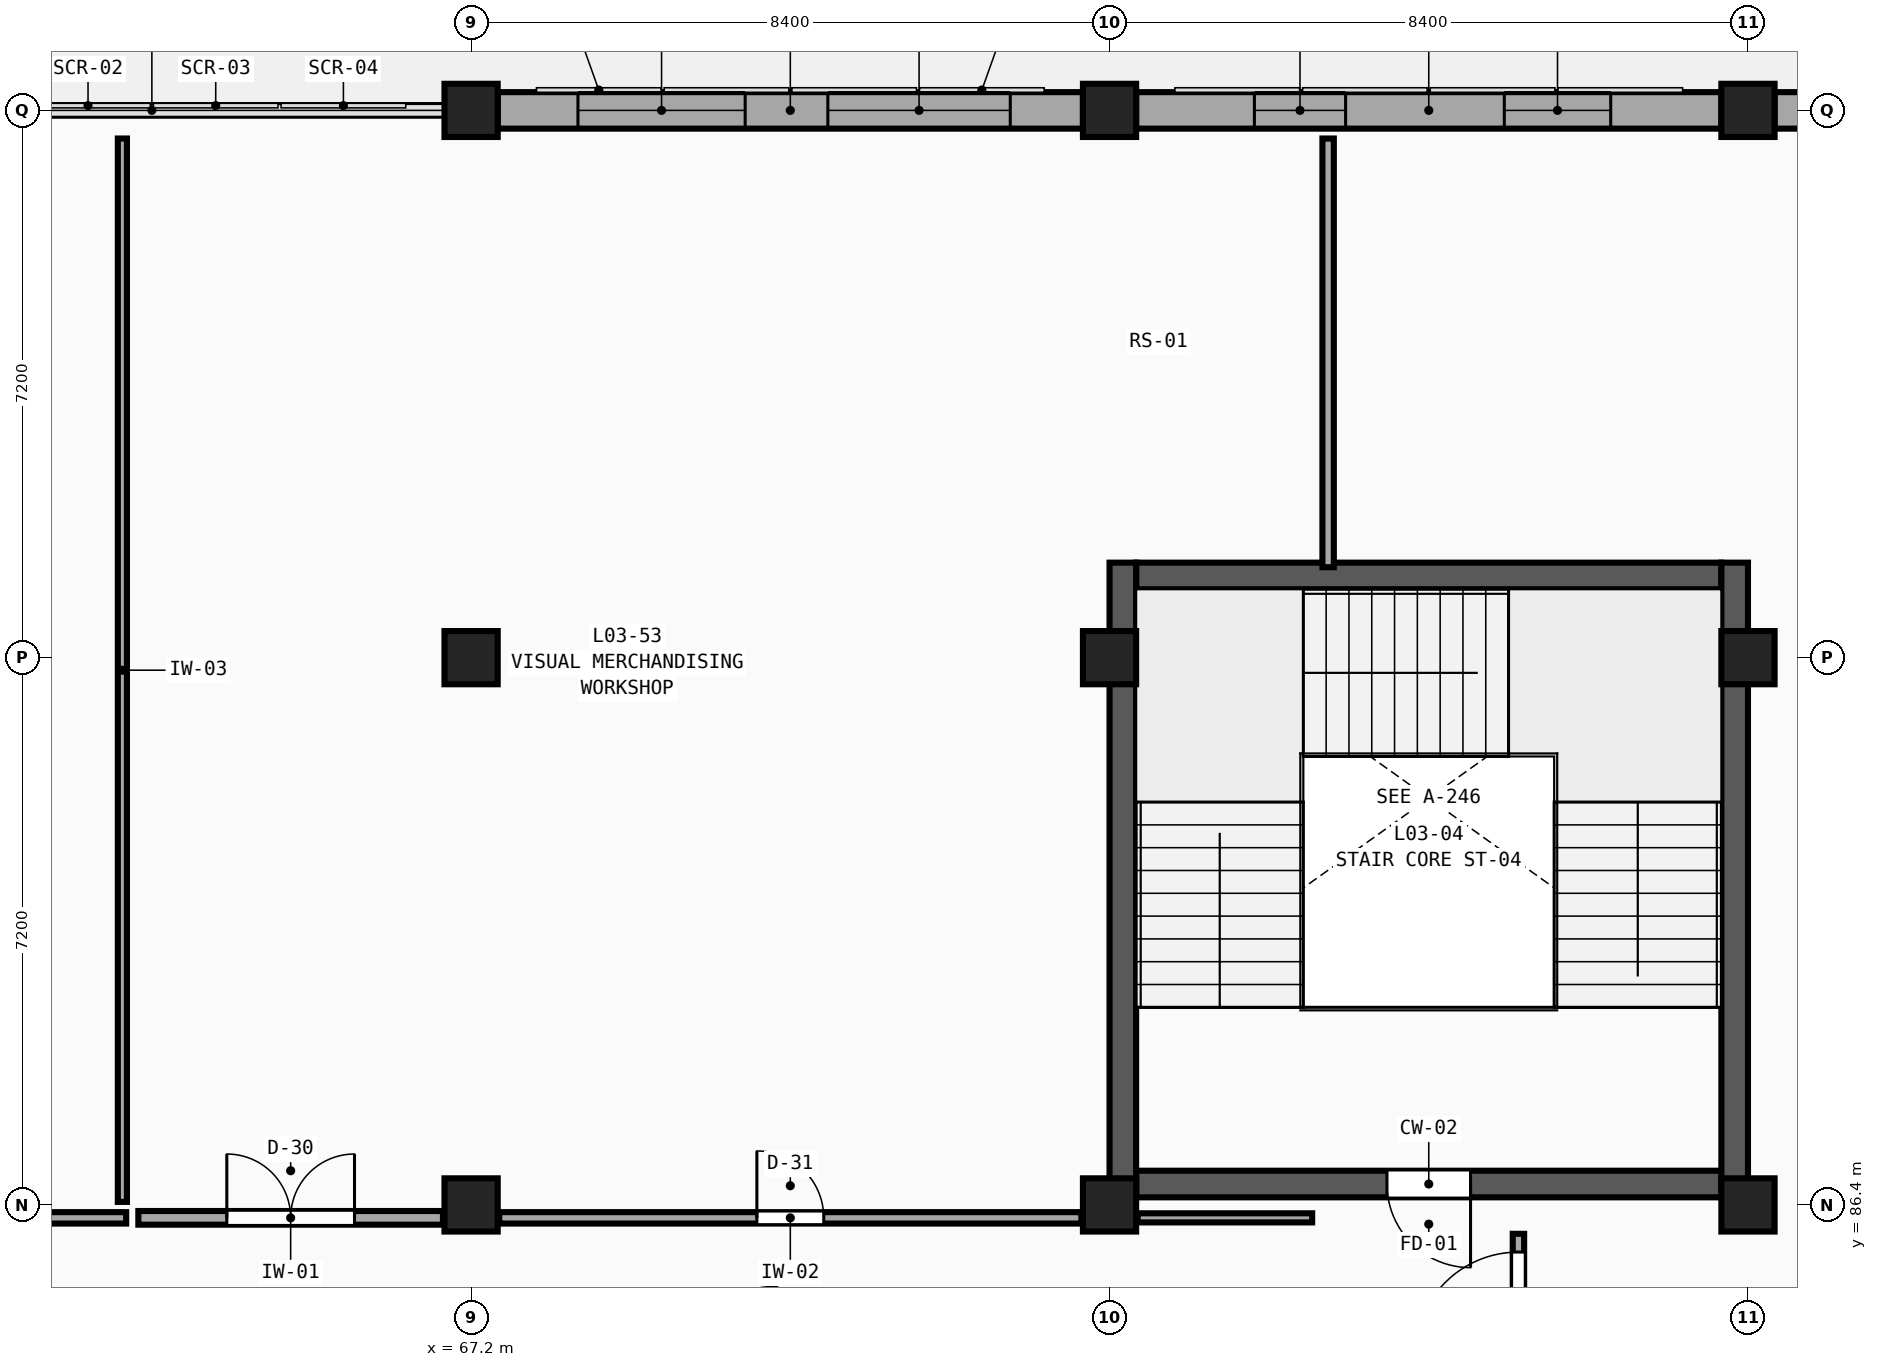
"""IFC4 building model, lengths in metres.
Left out: names, types, materials, properties, quantities, classifications, styles, units other than length and angle.
Written with IfcOpenShell. Run it as: python <this file> out.ifc"""

import sys

from ifc_helpers import new_model, si_unit, direction, frame, frame_2d, origin, origin_2d, place, context, subcontext, project, spatial, rectangle, extrude, element, fill, save


model = new_model("IFC4")
c1 = context("Model", 3, precision=1e-05, world=origin(), true_north=direction((0.0, 1.0)))
c2 = subcontext(c1, "Body", "Model", "MODEL_VIEW")
j1 = project(units=[si_unit("LENGTHUNIT", "METRE"), si_unit("PLANEANGLEUNIT", "RADIAN")], contexts=[c1])
p1 = place(None, origin())
s1 = spatial("IfcSite", under=j1, at=p1, CompositionType="ELEMENT")
p2 = place(p1, origin())
s2 = spatial("IfcBuilding", under=s1, at=p2, CompositionType="ELEMENT")
p3 = place(p2, frame((0.0, 0.0, 14.4)))
s3 = spatial("IfcBuildingStorey", under=s2, at=p3, CompositionType="ELEMENT", Elevation=14.4)
for number, where, z_axis, x_axis in (
    (1, (67.2, 86.4, 0.0), (0.0, 0.0, 1.0), (1.0, 0.0, 0.0)),
    (2, (67.2, 93.6, 0.0), (0.0, 0.0, 1.0), (1.0, 0.0, 0.0)),
    (3, (67.2, 100.8, 0.0), (0.0, 0.0, 1.0), (1.0, 0.0, 0.0)),
    (4, (75.6, 86.4, 0.0), (0.0, 0.0, 1.0), (1.0, 0.0, 0.0)),
    (5, (75.6, 93.6, 0.0), (0.0, 0.0, 1.0), (1.0, 0.0, 0.0)),
    (6, (75.6, 100.8, 0.0), (0.0, 0.0, 1.0), (1.0, 0.0, 0.0)),
    (7, (84.0, 86.4, 0.0), (0.0, 0.0, 1.0), (1.0, 0.0, 0.0)),
    (8, (84.0, 93.6, 0.0), (0.0, 0.0, 1.0), (1.0, 0.0, 0.0)),
    (9, (84.0, 100.8, 0.0), (0.0, 0.0, 1.0), (1.0, 0.0, 0.0)),
):
    element("IfcColumn", number, at=place(p3, frame(where, z_axis=z_axis, x_axis=x_axis)), inside=s3, PredefinedType="COLUMN", context=c2, shape_type="SweptSolid", body=[
        extrude(rectangle(XDim=0.7, YDim=0.7, at=origin_2d()), origin(), (0.0, 0.0, 1.0), 4.5),
    ])
p4 = place(p3, frame((67.55, 100.8, 0.0), z_axis=(0.0, 0.0, 1.0), x_axis=(1.0, 0.0, 0.0)))
e10 = element("IfcWall", 10, at=p4, inside=s3, PredefinedType="SOLIDWALL", context=c2, shape_type="SweptSolid", body=[
    extrude(rectangle(XDim=7.7, YDim=0.48, at=frame_2d((3.85, 0.0))), origin(), (0.0, 0.0, 1.0), 3.63),
])
p5 = place(p4, frame((1.056, 0.0, 0.75)))
e11 = element("IfcOpeningElement", 11, at=p5, cuts=e10, PredefinedType="OPENING", context=c2, shape_type="SweptSolid", body=[
    extrude(rectangle(XDim=2.2, YDim=2.73, at=frame_2d((1.1, 1.365))), frame((0.0, 0.26, 0.0), z_axis=(0.0, -1.0, 0.0), x_axis=(1.0, 0.0, 0.0)), (0.0, 0.0, 1.0), 0.52),
])
p6 = place(p4, frame((4.344, 0.0, 0.75)))
e12 = element("IfcOpeningElement", 12, at=p6, cuts=e10, PredefinedType="OPENING", context=c2, shape_type="SweptSolid", body=[
    extrude(rectangle(XDim=2.4, YDim=2.73, at=frame_2d((1.2, 1.365))), frame((0.0, 0.26, 0.0), z_axis=(0.0, -1.0, 0.0), x_axis=(1.0, 0.0, 0.0)), (0.0, 0.0, 1.0), 0.52),
])
p7 = place(p3, frame((75.95, 100.8, 0.0), z_axis=(0.0, 0.0, 1.0), x_axis=(1.0, 0.0, 0.0)))
e13 = element("IfcWall", 13, at=p7, inside=s3, PredefinedType="SOLIDWALL", context=c2, shape_type="SweptSolid", body=[
    extrude(rectangle(XDim=7.7, YDim=0.48, at=frame_2d((3.85, 0.0))), origin(), (0.0, 0.0, 1.0), 3.63),
])
p8 = place(p7, frame((1.556, 0.0, 0.75)))
e14 = element("IfcOpeningElement", 14, at=p8, cuts=e13, PredefinedType="OPENING", context=c2, shape_type="SweptSolid", body=[
    extrude(rectangle(XDim=1.2, YDim=2.73, at=frame_2d((0.6, 1.365))), frame((0.0, 0.26, 0.0), z_axis=(0.0, -1.0, 0.0), x_axis=(1.0, 0.0, 0.0)), (0.0, 0.0, 1.0), 0.52),
])
p9 = place(p7, frame((4.844, 0.0, 0.75)))
e15 = element("IfcOpeningElement", 15, at=p9, cuts=e13, PredefinedType="OPENING", context=c2, shape_type="SweptSolid", body=[
    extrude(rectangle(XDim=1.4, YDim=2.73, at=frame_2d((0.7, 1.365))), frame((0.0, 0.26, 0.0), z_axis=(0.0, -1.0, 0.0), x_axis=(1.0, 0.0, 0.0)), (0.0, 0.0, 1.0), 0.52),
])
p10 = place(p3, frame((84.35, 100.8, 0.0), z_axis=(0.0, 0.0, 1.0), x_axis=(1.0, 0.0, 0.0)))
e16 = element("IfcWall", 16, at=p10, inside=s3, PredefinedType="SOLIDWALL", context=c2, shape_type="SweptSolid", body=[
    extrude(rectangle(XDim=7.7, YDim=0.48, at=frame_2d((3.85, 0.0))), origin(), (0.0, 0.0, 1.0), 3.63),
])
p11 = place(p10, frame((1.456, 0.0, 0.75)))
e17 = element("IfcOpeningElement", 17, at=p11, cuts=e16, PredefinedType="OPENING", context=c2, shape_type="SweptSolid", body=[
    extrude(rectangle(XDim=1.4, YDim=1.9, at=frame_2d((0.7, 0.95))), frame((0.0, 0.26, 0.0), z_axis=(0.0, -1.0, 0.0), x_axis=(1.0, 0.0, 0.0)), (0.0, 0.0, 1.0), 0.52),
])
p12 = place(p10, frame((4.744, 0.0, 0.75)))
e18 = element("IfcOpeningElement", 18, at=p12, cuts=e16, PredefinedType="OPENING", context=c2, shape_type="SweptSolid", body=[
    extrude(rectangle(XDim=1.6, YDim=1.9, at=frame_2d((0.8, 0.95))), frame((0.0, 0.26, 0.0), z_axis=(0.0, -1.0, 0.0), x_axis=(1.0, 0.0, 0.0)), (0.0, 0.0, 1.0), 0.52),
])
p13 = place(p3, frame((83.65, 86.675, 0.0), z_axis=(0.0, 0.0, 1.0), x_axis=(-1.0, 0.0, 0.0)))
e19 = element("IfcWall", 19, at=p13, inside=s3, PredefinedType="SHEAR", context=c2, shape_type="SweptSolid", body=[
    extrude(rectangle(XDim=7.7, YDim=0.35, at=frame_2d((3.85, 0.0))), origin(), (0.0, 0.0, 1.0), 4.5),
])
p14 = place(p13, frame((3.3, 0.0, 0.0)))
e20 = element("IfcOpeningElement", 20, at=p14, cuts=e19, PredefinedType="OPENING", context=c2, shape_type="SweptSolid", body=[
    extrude(rectangle(XDim=1.1, YDim=2.2, at=frame_2d((0.55, 1.1))), frame((0.0, 0.195, 0.0), z_axis=(0.0, -1.0, 0.0), x_axis=(1.0, 0.0, 0.0)), (0.0, 0.0, 1.0), 0.39),
])
p15 = place(p3, frame((75.95, 94.675, 0.0), z_axis=(0.0, 0.0, 1.0), x_axis=(1.0, 0.0, 0.0)))
e21 = element("IfcWall", 21, at=p15, inside=s3, PredefinedType="SHEAR", context=c2, shape_type="SweptSolid", body=[
    extrude(rectangle(XDim=7.7, YDim=0.35, at=frame_2d((3.85, 0.0))), origin(), (0.0, 0.0, 1.0), 4.5),
])
for number, where, z_axis, x_axis in (
    (22, (75.775, 94.85, 0.0), (0.0, 0.0, 1.0), (0.0, -1.0, 0.0)),
    (23, (83.825, 86.5, 0.0), (0.0, 0.0, 1.0), (0.0, 1.0, 0.0)),
):
    element("IfcWall", number, at=place(p3, frame(where, z_axis=z_axis, x_axis=x_axis)), inside=s3, PredefinedType="SHEAR", context=c2, shape_type="SweptSolid", body=[
        extrude(rectangle(XDim=8.35, YDim=0.35, at=frame_2d((4.175, 0.0))), origin(), (0.0, 0.0, 1.0), 4.5),
    ])
p16 = place(p3, frame((62.822, 86.23, 0.0), z_axis=(0.0, 0.0, 1.0), x_axis=(1.0, 0.0, 0.0)))
e24 = element("IfcWall", 24, at=p16, inside=s3, PredefinedType="PARTITIONING", context=c2, shape_type="SweptSolid", body=[
    extrude(rectangle(XDim=4.008, YDim=0.18, at=frame_2d((2.004, 0.0))), origin(), (0.0, 0.0, 1.0), 3.73),
])
p17 = place(p16, frame((1.164, 0.0, 0.0)))
e25 = element("IfcOpeningElement", 25, at=p17, cuts=e24, PredefinedType="OPENING", context=c2, shape_type="SweptSolid", body=[
    extrude(rectangle(XDim=1.68, YDim=2.37, at=frame_2d((0.84, 1.185))), frame((0.0, 0.11, 0.0), z_axis=(0.0, -1.0, 0.0), x_axis=(1.0, 0.0, 0.0)), (0.0, 0.0, 1.0), 0.22),
])
p18 = place(p3, frame((67.57, 86.23, 0.0), z_axis=(0.0, 0.0, 1.0), x_axis=(1.0, 0.0, 0.0)))
e26 = element("IfcWall", 26, at=p18, inside=s3, PredefinedType="PARTITIONING", context=c2, shape_type="SweptSolid", body=[
    extrude(rectangle(XDim=7.66, YDim=0.15, at=frame_2d((3.83, 0.0))), origin(), (0.0, 0.0, 1.0), 3.73),
])
p19 = place(p18, frame((3.39, 0.0, 0.0)))
e27 = element("IfcOpeningElement", 27, at=p19, cuts=e26, PredefinedType="OPENING", context=c2, shape_type="SweptSolid", body=[
    extrude(rectangle(XDim=0.88, YDim=2.45, at=frame_2d((0.44, 1.225))), frame((0.0, 0.095, 0.0), z_axis=(0.0, -1.0, 0.0), x_axis=(1.0, 0.0, 0.0)), (0.0, 0.0, 1.0), 0.19),
])
p20 = place(p3, frame((75.97, 86.23, 0.0), z_axis=(0.0, 0.0, 1.0), x_axis=(1.0, 0.0, 0.0)))
e28 = element("IfcWall", 28, at=p20, inside=s3, PredefinedType="PARTITIONING", context=c2, shape_type="SweptSolid", body=[
    extrude(rectangle(XDim=2.296, YDim=0.12, at=frame_2d((1.148, 0.0))), origin(), (0.0, 0.0, 1.0), 3.73),
])
p21 = place(p3, frame((59.17, 86.23, 0.0), z_axis=(0.0, 0.0, 1.0), x_axis=(1.0, 0.0, 0.0)))
e29 = element("IfcWall", 29, at=p21, inside=s3, PredefinedType="PARTITIONING", context=c2, shape_type="SweptSolid", body=[
    extrude(rectangle(XDim=3.492, YDim=0.15, at=frame_2d((1.746, 0.0))), origin(), (0.0, 0.0, 1.0), 3.73),
])
p22 = place(p21, frame((1.306, 0.0, 0.0)))
e30 = element("IfcOpeningElement", 30, at=p22, cuts=e29, PredefinedType="OPENING", context=c2, shape_type="SweptSolid", body=[
    extrude(rectangle(XDim=0.88, YDim=2.05, at=frame_2d((0.44, 1.025))), frame((0.0, 0.095, 0.0), z_axis=(0.0, -1.0, 0.0), x_axis=(1.0, 0.0, 0.0)), (0.0, 0.0, 1.0), 0.19),
])
p23 = place(p3, frame((80.98, 84.18, 0.0), z_axis=(0.0, 0.0, 1.0), x_axis=(0.0, 1.0, 0.0)))
e31 = element("IfcWall", 31, at=p23, inside=s3, PredefinedType="PARTITIONING", context=c2, shape_type="SweptSolid", body=[
    extrude(rectangle(XDim=1.84, YDim=0.15, at=frame_2d((0.92, 0.0))), origin(), (0.0, 0.0, 1.0), 4.18),
])
p24 = place(p23, frame((0.24, 0.0, 0.0)))
e32 = element("IfcOpeningElement", 32, at=p24, cuts=e31, PredefinedType="OPENING", context=c2, shape_type="SweptSolid", body=[
    extrude(rectangle(XDim=1.36, YDim=2.13, at=frame_2d((0.68, 1.065))), frame((0.0, 0.095, 0.0), z_axis=(0.0, -1.0, 0.0), x_axis=(1.0, 0.0, 0.0)), (0.0, 0.0, 1.0), 0.19),
])
p25 = place(p3, frame((62.612, 86.44, 0.0), z_axis=(0.0, 0.0, 1.0), x_axis=(0.0, 1.0, 0.0)))
e33 = element("IfcWall", 33, at=p25, inside=s3, PredefinedType="PARTITIONING", context=c2, shape_type="SweptSolid", body=[
    extrude(rectangle(XDim=13.99, YDim=0.12, at=frame_2d((6.995, 0.0))), origin(), (0.0, 0.0, 1.0), 4.18),
])
p26 = place(p3, frame((78.476, 94.79, 0.0), z_axis=(0.0, 0.0, 1.0), x_axis=(0.0, 1.0, 0.0)))
e34 = element("IfcWall", 34, at=p26, inside=s3, PredefinedType="PARTITIONING", context=c2, shape_type="SweptSolid", body=[
    extrude(rectangle(XDim=5.64, YDim=0.15, at=frame_2d((2.82, 0.0))), origin(), (0.0, 0.0, 1.0), 4.18),
])
p27 = place(p5, origin())
e35 = element("IfcWindow", 35, at=p27, inside=s3, PartitioningType="TRIPLE_PANEL_VERTICAL", PredefinedType="WINDOW", context=c2, shape_type="SweptSolid", body=[
    extrude(rectangle(XDim=2.2, YDim=2.73, at=frame_2d((1.1, 1.365))), frame((0.0, 0.03, 0.0), z_axis=(0.0, -1.0, 0.0), x_axis=(1.0, 0.0, 0.0)), (0.0, 0.0, 1.0), 0.06),
])
fill(e11, e35)
p28 = place(p6, origin())
e36 = element("IfcWindow", 36, at=p28, inside=s3, PartitioningType="TRIPLE_PANEL_VERTICAL", PredefinedType="WINDOW", context=c2, shape_type="SweptSolid", body=[
    extrude(rectangle(XDim=2.4, YDim=2.73, at=frame_2d((1.2, 1.365))), frame((0.0, 0.03, 0.0), z_axis=(0.0, -1.0, 0.0), x_axis=(1.0, 0.0, 0.0)), (0.0, 0.0, 1.0), 0.06),
])
fill(e12, e36)
p29 = place(p8, origin())
e37 = element("IfcWindow", 37, at=p29, inside=s3, PartitioningType="SINGLE_PANEL", PredefinedType="WINDOW", context=c2, shape_type="SweptSolid", body=[
    extrude(rectangle(XDim=1.2, YDim=2.73, at=frame_2d((0.6, 1.365))), frame((0.0, 0.03, 0.0), z_axis=(0.0, -1.0, 0.0), x_axis=(1.0, 0.0, 0.0)), (0.0, 0.0, 1.0), 0.06),
])
fill(e14, e37)
p30 = place(p9, origin())
e38 = element("IfcWindow", 38, at=p30, inside=s3, PartitioningType="DOUBLE_PANEL_VERTICAL", PredefinedType="WINDOW", context=c2, shape_type="SweptSolid", body=[
    extrude(rectangle(XDim=1.4, YDim=2.73, at=frame_2d((0.7, 1.365))), frame((0.0, 0.03, 0.0), z_axis=(0.0, -1.0, 0.0), x_axis=(1.0, 0.0, 0.0)), (0.0, 0.0, 1.0), 0.06),
])
fill(e15, e38)
p31 = place(p14, origin())
e39 = element("IfcDoor", 39, at=p31, inside=s3, OperationType="SINGLE_SWING_LEFT", PredefinedType="DOOR", context=c2, shape_type="SweptSolid", body=[
    extrude(rectangle(XDim=1.1, YDim=2.2, at=frame_2d((0.55, 1.1))), frame((0.0, 0.025, 0.0), z_axis=(0.0, -1.0, 0.0), x_axis=(1.0, 0.0, 0.0)), (0.0, 0.0, 1.0), 0.05),
])
fill(e20, e39)
p32 = place(p17, origin())
e40 = element("IfcDoor", 40, at=p32, inside=s3, OperationType="DOUBLE_DOOR_SINGLE_SWING", PredefinedType="DOOR", context=c2, shape_type="SweptSolid", body=[
    extrude(rectangle(XDim=1.68, YDim=2.37, at=frame_2d((0.84, 1.185))), frame((0.0, 0.025, 0.0), z_axis=(0.0, -1.0, 0.0), x_axis=(1.0, 0.0, 0.0)), (0.0, 0.0, 1.0), 0.05),
])
fill(e25, e40)
p33 = place(p19, origin())
e41 = element("IfcDoor", 41, at=p33, inside=s3, OperationType="SINGLE_SWING_LEFT", PredefinedType="DOOR", context=c2, shape_type="SweptSolid", body=[
    extrude(rectangle(XDim=0.88, YDim=2.45, at=frame_2d((0.44, 1.225))), frame((0.0, 0.025, 0.0), z_axis=(0.0, -1.0, 0.0), x_axis=(1.0, 0.0, 0.0)), (0.0, 0.0, 1.0), 0.05),
])
fill(e27, e41)
p34 = place(p24, origin())
e42 = element("IfcDoor", 42, at=p34, inside=s3, OperationType="SINGLE_SWING_LEFT", PredefinedType="DOOR", context=c2, shape_type="SweptSolid", body=[
    extrude(rectangle(XDim=1.36, YDim=2.13, at=frame_2d((0.68, 1.065))), frame((0.0, 0.025, 0.0), z_axis=(0.0, -1.0, 0.0), x_axis=(1.0, 0.0, 0.0)), (0.0, 0.0, 1.0), 0.05),
])
fill(e32, e42)
save(model, sys.argv[1])
